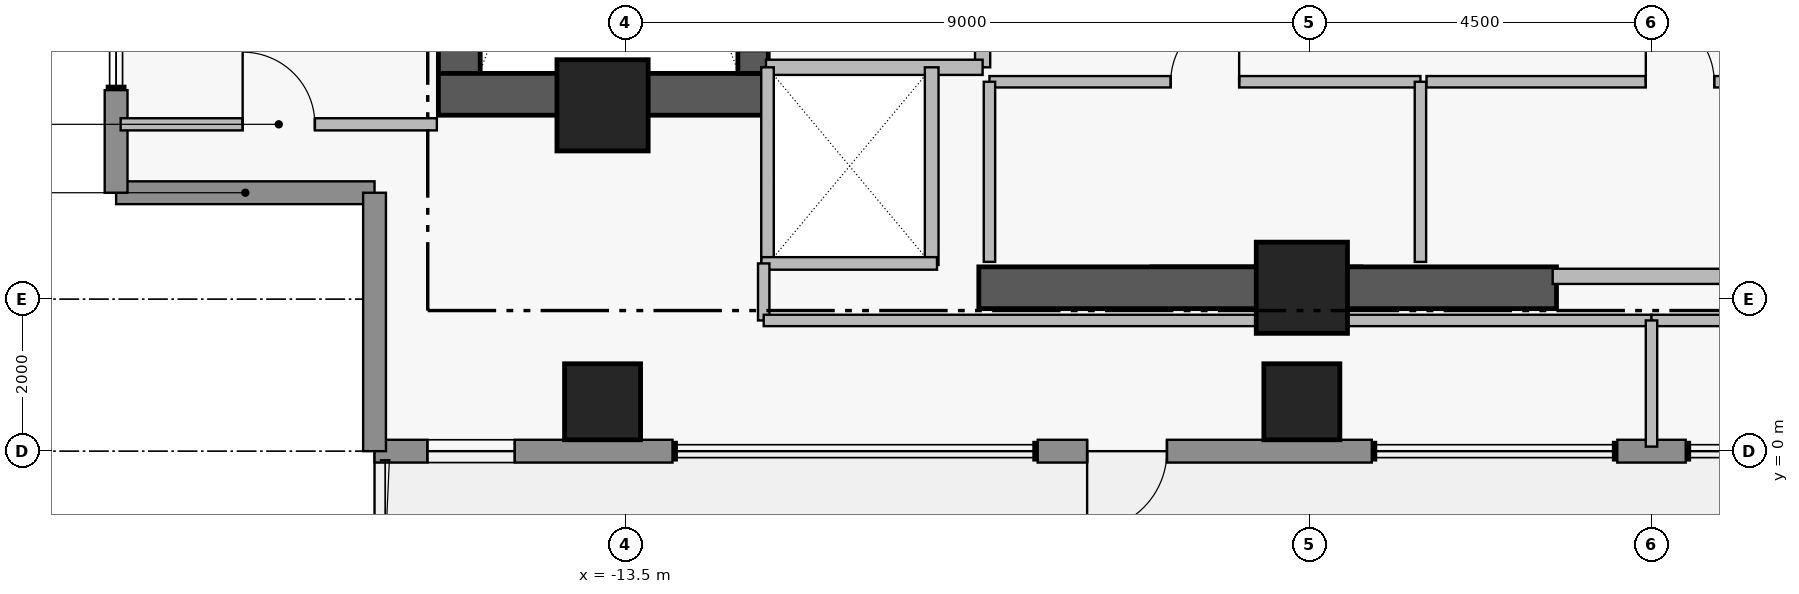
"""IFC4 building model, lengths in metres.
Left out: names, types, materials, properties, quantities, classifications, styles, units other than length and angle.
Written with IfcOpenShell. Run it as: python <this file> out.ifc"""

import sys

from ifc_helpers import new_model, si_unit, direction, frame, frame_2d, origin, origin_2d, place, context, subcontext, project, spatial, rectangle, extrude, element, fill, save


model = new_model("IFC4")
c1 = context("Model", 3, precision=1e-05, world=origin(), true_north=direction((0.0, 1.0)))
c2 = subcontext(c1, "Body", "Model", "MODEL_VIEW")
j1 = project(units=[si_unit("LENGTHUNIT", "METRE"), si_unit("PLANEANGLEUNIT", "RADIAN")], contexts=[c1])
p1 = place(None, origin())
s1 = spatial("IfcSite", under=j1, at=p1, CompositionType="ELEMENT")
p2 = place(p1, origin())
s2 = spatial("IfcBuilding", under=s1, at=p2, CompositionType="ELEMENT")
p3 = place(p2, frame((0.0, 0.0, 250.75)))
s3 = spatial("IfcBuildingStorey", under=s2, at=p3, CompositionType="ELEMENT", Elevation=250.75)
p4 = place(p3, frame((-15.685, 4.97, 0.0), z_axis=(0.0, 0.0, 1.0), x_axis=(0.0, 1.0, 0.0)))
e1 = element("IfcWall", 1, at=p4, inside=s3, PredefinedType="SHEAR", context=c2, shape_type="SweptSolid", body=[
    extrude(rectangle(XDim=8.96, YDim=0.55, at=frame_2d((4.48, 0.0))), origin(), (0.0, 0.0, 1.0), 3.51),
])
p5 = place(p3, frame((-15.96, 4.695, 0.0), z_axis=(0.0, 0.0, 1.0), x_axis=(1.0, 0.0, 0.0)))
e2 = element("IfcWall", 2, at=p5, inside=s3, PredefinedType="SHEAR", context=c2, shape_type="SweptSolid", body=[
    extrude(rectangle(XDim=4.36, YDim=0.55, at=frame_2d((2.18, 0.0))), origin(), (0.0, 0.0, 1.0), 3.51),
])
p6 = place(p3, frame((-8.85, 2.15, 0.0), z_axis=(0.0, 0.0, 1.0), x_axis=(1.0, 0.0, 0.0)))
e3 = element("IfcWall", 3, at=p6, inside=s3, PredefinedType="SHEAR", context=c2, shape_type="SweptSolid", body=[
    extrude(rectangle(XDim=7.6, YDim=0.55, at=frame_2d((3.8, 0.0))), origin(), (0.0, 0.0, 1.0), 3.48),
])
p7 = place(p3, frame((-11.82, 4.97, 0.0), z_axis=(0.0, 0.0, 1.0), x_axis=(0.0, 1.0, 0.0)))
e4 = element("IfcWall", 4, at=p7, inside=s3, PredefinedType="SHEAR", context=c2, shape_type="SweptSolid", body=[
    extrude(rectangle(XDim=8.96, YDim=0.4, at=frame_2d((4.48, 0.0))), origin(), (0.0, 0.0, 1.0), 3.51),
])
p8 = place(p7, frame((0.31, 0.0, 0.0)))
e5 = element("IfcOpeningElement", 5, at=p8, cuts=e4, PredefinedType="OPENING", context=c2, shape_type="SweptSolid", body=[
    extrude(rectangle(XDim=1.12, YDim=2.22, at=frame_2d((0.56, 1.11))), frame((0.0, 0.21, 0.0), z_axis=(0.0, -1.0, 0.0), x_axis=(1.0, 0.0, 0.0)), (0.0, 0.0, 1.0), 0.42),
])
for number, where, z_axis, x_axis in (
    (6, (-13.8, 4.55, 0.0), (0.0, 0.0, 1.0), (1.0, 0.0, 0.0)),
    (7, (-4.6, 2.15, 0.0), (0.0, 0.0, 1.0), (1.0, 0.0, 0.0)),
):
    element("IfcColumn", number, at=place(p3, frame(where, z_axis=z_axis, x_axis=x_axis)), inside=s3, PredefinedType="COLUMN", context=c2, shape_type="SweptSolid", body=[
        extrude(rectangle(XDim=1.2, YDim=1.2, at=origin_2d()), origin(), (0.0, 0.0, 1.0), 3.7),
    ])
for number, where, z_axis, x_axis in (
    (8, (-13.8, 0.65, 0.0), (0.0, 0.0, 1.0), (1.0, 0.0, 0.0)),
    (9, (-4.6, 0.65, 0.0), (0.0, 0.0, 1.0), (1.0, 0.0, 0.0)),
):
    element("IfcColumn", number, at=place(p3, frame(where, z_axis=z_axis, x_axis=x_axis)), inside=s3, PredefinedType="COLUMN", context=c2, shape_type="SweptSolid", body=[
        extrude(rectangle(XDim=1.0, YDim=1.0, at=origin_2d()), origin(), (0.0, 0.0, 1.0), 3.7),
    ])
p9 = place(p3, frame((-16.8, 3.4, 0.0), z_axis=(0.0, 0.0, 1.0), x_axis=(-1.0, 0.0, 0.0)))
e10 = element("IfcWall", 10, at=p9, inside=s3, PredefinedType="STANDARD", context=c2, shape_type="SweptSolid", body=[
    extrude(rectangle(XDim=3.4, YDim=0.3, at=frame_2d((1.7, 0.0))), origin(), (0.0, 0.0, 1.0), 3.48),
])
p10 = place(p3, frame((-20.2, 3.4, 0.0), z_axis=(0.0, 0.0, 1.0), x_axis=(0.0, 1.0, 0.0)))
e11 = element("IfcWall", 11, at=p10, inside=s3, PredefinedType="STANDARD", context=c2, shape_type="SweptSolid", body=[
    extrude(rectangle(XDim=1.35, YDim=0.3, at=frame_2d((0.675, 0.0))), origin(), (0.0, 0.0, 1.0), 3.48),
])
p11 = place(p3, frame((0.45, 0.0, 0.0), z_axis=(0.0, 0.0, 1.0), x_axis=(-1.0, 0.0, 0.0)))
e12 = element("IfcWall", 12, at=p11, inside=s3, PredefinedType="STANDARD", context=c2, shape_type="SweptSolid", body=[
    extrude(rectangle(XDim=0.9, YDim=0.3, at=frame_2d((0.45, 0.0))), origin(), (0.0, 0.0, 1.0), 3.48),
])
p12 = place(p3, frame((-3.68, 0.0, 0.0), z_axis=(0.0, 0.0, 1.0), x_axis=(-1.0, 0.0, 0.0)))
e13 = element("IfcWall", 13, at=p12, inside=s3, PredefinedType="STANDARD", context=c2, shape_type="SweptSolid", body=[
    extrude(rectangle(XDim=4.395, YDim=0.3, at=frame_2d((2.198, 0.0))), origin(), (0.0, 0.0, 1.0), 3.48),
])
p13 = place(p12, frame((2.695, 0.0, 0.0)))
e14 = element("IfcOpeningElement", 14, at=p13, cuts=e13, PredefinedType="OPENING", context=c2, shape_type="SweptSolid", body=[
    extrude(rectangle(XDim=1.05, YDim=2.2, at=frame_2d((0.525, 1.1))), frame((0.0, 0.16, 0.0), z_axis=(0.0, -1.0, 0.0), x_axis=(1.0, 0.0, 0.0)), (0.0, 0.0, 1.0), 0.32),
])
p14 = place(p3, frame((-12.88, 0.0, 0.0), z_axis=(0.0, 0.0, 1.0), x_axis=(-1.0, 0.0, 0.0)))
e15 = element("IfcWall", 15, at=p14, inside=s3, PredefinedType="STANDARD", context=c2, shape_type="SweptSolid", body=[
    extrude(rectangle(XDim=3.92, YDim=0.3, at=frame_2d((1.96, 0.0))), origin(), (0.0, 0.0, 1.0), 3.48),
])
p15 = place(p14, frame((2.075, 0.0, 0.95)))
e16 = element("IfcOpeningElement", 16, at=p15, cuts=e15, PredefinedType="OPENING", context=c2, shape_type="SweptSolid", body=[
    extrude(rectangle(XDim=1.15, YDim=1.55, at=frame_2d((0.575, 0.775))), frame((0.0, 0.16, 0.0), z_axis=(0.0, -1.0, 0.0), x_axis=(1.0, 0.0, 0.0)), (0.0, 0.0, 1.0), 0.32),
])
p16 = place(p3, frame((-16.8, 0.0, 0.0), z_axis=(0.0, 0.0, 1.0), x_axis=(0.0, 1.0, 0.0)))
e17 = element("IfcWall", 17, at=p16, inside=s3, PredefinedType="STANDARD", context=c2, shape_type="SweptSolid", body=[
    extrude(rectangle(XDim=3.4, YDim=0.3, at=frame_2d((1.7, 0.0))), origin(), (0.0, 0.0, 1.0), 3.48),
])
p17 = place(p3, frame((-8.8, 5.05, 0.0), z_axis=(0.0, 0.0, 1.0), x_axis=(0.0, 1.0, 0.0)))
e18 = element("IfcWall", 18, at=p17, inside=s3, PredefinedType="PARTITIONING", context=c2, shape_type="SweptSolid", body=[
    extrude(rectangle(XDim=6.1, YDim=0.2, at=frame_2d((3.05, 0.0))), origin(), (0.0, 0.0, 1.0), 3.48),
])
p18 = place(p17, frame((0.25, 0.0, 0.0)))
e19 = element("IfcOpeningElement", 19, at=p18, cuts=e18, PredefinedType="OPENING", context=c2, shape_type="SweptSolid", body=[
    extrude(rectangle(XDim=1.1, YDim=2.2, at=frame_2d((0.55, 1.1))), frame((0.0, 0.11, 0.0), z_axis=(0.0, -1.0, 0.0), x_axis=(1.0, 0.0, 0.0)), (0.0, 0.0, 1.0), 0.22),
])
p19 = place(p17, frame((3.85, 0.0, 0.0)))
e20 = element("IfcOpeningElement", 20, at=p19, cuts=e18, PredefinedType="OPENING", context=c2, shape_type="SweptSolid", body=[
    extrude(rectangle(XDim=1.1, YDim=2.2, at=frame_2d((0.55, 1.1))), frame((0.0, 0.11, 0.0), z_axis=(0.0, -1.0, 0.0), x_axis=(1.0, 0.0, 0.0)), (0.0, 0.0, 1.0), 0.22),
])
p20 = place(p3, frame((-8.71, 4.86, 0.0), z_axis=(0.0, 0.0, 1.0), x_axis=(1.0, 0.0, 0.0)))
e21 = element("IfcWall", 21, at=p20, inside=s3, PredefinedType="PARTITIONING", context=c2, shape_type="SweptSolid", body=[
    extrude(rectangle(XDim=5.67, YDim=0.15, at=frame_2d((2.835, 0.0))), origin(), (0.0, 0.0, 1.0), 3.48),
])
p21 = place(p20, frame((2.385, 0.0, 0.0)))
e22 = element("IfcOpeningElement", 22, at=p21, cuts=e21, PredefinedType="OPENING", context=c2, shape_type="SweptSolid", body=[
    extrude(rectangle(XDim=0.9, YDim=2.15, at=frame_2d((0.45, 1.075))), frame((0.0, 0.085, 0.0), z_axis=(0.0, -1.0, 0.0), x_axis=(1.0, 0.0, 0.0)), (0.0, 0.0, 1.0), 0.17),
])
p22 = place(p3, frame((-2.96, 4.86, 0.0), z_axis=(0.0, 0.0, 1.0), x_axis=(1.0, 0.0, 0.0)))
e23 = element("IfcWall", 23, at=p22, inside=s3, PredefinedType="PARTITIONING", context=c2, shape_type="SweptSolid", body=[
    extrude(rectangle(XDim=6.67, YDim=0.15, at=frame_2d((3.335, 0.0))), origin(), (0.0, 0.0, 1.0), 3.48),
])
p23 = place(p22, frame((2.885, 0.0, 0.0)))
e24 = element("IfcOpeningElement", 24, at=p23, cuts=e23, PredefinedType="OPENING", context=c2, shape_type="SweptSolid", body=[
    extrude(rectangle(XDim=0.9, YDim=2.15, at=frame_2d((0.45, 1.075))), frame((0.0, 0.085, 0.0), z_axis=(0.0, -1.0, 0.0), x_axis=(1.0, 0.0, 0.0)), (0.0, 0.0, 1.0), 0.17),
])
p24 = place(p3, frame((-20.14, 4.3, 0.0), z_axis=(0.0, 0.0, 1.0), x_axis=(1.0, 0.0, 0.0)))
e25 = element("IfcWall", 25, at=p24, inside=s3, PredefinedType="PARTITIONING", context=c2, shape_type="SweptSolid", body=[
    extrude(rectangle(XDim=4.16, YDim=0.16, at=frame_2d((2.08, 0.0))), origin(), (0.0, 0.0, 1.0), 3.48),
])
p25 = place(p24, frame((1.605, 0.0, 0.0)))
e26 = element("IfcOpeningElement", 26, at=p25, cuts=e25, PredefinedType="OPENING", context=c2, shape_type="SweptSolid", body=[
    extrude(rectangle(XDim=0.95, YDim=2.15, at=frame_2d((0.475, 1.075))), frame((0.0, 0.09, 0.0), z_axis=(0.0, -1.0, 0.0), x_axis=(1.0, 0.0, 0.0)), (0.0, 0.0, 1.0), 0.18),
])
p26 = place(p3, frame((-11.65, 5.05, 0.0), z_axis=(0.0, 0.0, 1.0), x_axis=(1.0, 0.0, 0.0)))
e27 = element("IfcWall", 27, at=p26, inside=s3, PredefinedType="PARTITIONING", context=c2, shape_type="SweptSolid", body=[
    extrude(rectangle(XDim=2.85, YDim=0.2, at=frame_2d((1.425, 0.0))), origin(), (0.0, 0.0, 1.0), 3.48),
])
p27 = place(p3, frame((-1.3, 2.3, 0.0), z_axis=(0.0, 0.0, 1.0), x_axis=(1.0, 0.0, 0.0)))
e28 = element("IfcWall", 28, at=p27, inside=s3, PredefinedType="PARTITIONING", context=c2, shape_type="SweptSolid", body=[
    extrude(rectangle(XDim=2.6, YDim=0.2, at=frame_2d((1.3, 0.0))), origin(), (0.0, 0.0, 1.0), 2.38),
])
for number, where, z_axis, x_axis in (
    (29, (-8.71, 2.49, 0.0), (0.0, 0.0, 1.0), (0.0, 1.0, 0.0)),
    (30, (-3.04, 2.49, 0.0), (0.0, 0.0, 1.0), (0.0, 1.0, 0.0)),
):
    element("IfcWall", number, at=place(p3, frame(where, z_axis=z_axis, x_axis=x_axis)), inside=s3, PredefinedType="PARTITIONING", context=c2, shape_type="SweptSolid", body=[
        extrude(rectangle(XDim=2.37, YDim=0.15, at=frame_2d((1.185, 0.0))), origin(), (0.0, 0.0, 1.0), 3.48),
    ])
p28 = place(p3, frame((-9.47, 2.45, 0.0), z_axis=(0.0, 0.0, 1.0), x_axis=(0.0, 1.0, 0.0)))
e31 = element("IfcWall", 31, at=p28, inside=s3, PredefinedType="PARTITIONING", context=c2, shape_type="SweptSolid", body=[
    extrude(rectangle(XDim=2.6, YDim=0.18, at=frame_2d((1.3, 0.0))), origin(), (0.0, 0.0, 1.0), 3.48),
])
p29 = place(p3, frame((-11.63, 2.47, 0.0), z_axis=(0.0, 0.0, 1.0), x_axis=(0.0, 1.0, 0.0)))
e32 = element("IfcWall", 32, at=p29, inside=s3, PredefinedType="PARTITIONING", context=c2, shape_type="SweptSolid", body=[
    extrude(rectangle(XDim=2.58, YDim=0.165, at=frame_2d((1.29, 0.0))), origin(), (0.0, 0.0, 1.0), 3.48),
])
p30 = place(p3, frame((-11.71, 2.47, 0.0), z_axis=(0.0, 0.0, 1.0), x_axis=(1.0, 0.0, 0.0)))
e33 = element("IfcWall", 33, at=p30, inside=s3, PredefinedType="PARTITIONING", context=c2, shape_type="SweptSolid", body=[
    extrude(rectangle(XDim=2.31, YDim=0.165, at=frame_2d((1.155, 0.0))), origin(), (0.0, 0.0, 1.0), 2.38),
])
p31 = place(p3, frame((-11.68, 1.72, 0.0), z_axis=(0.0, 0.0, 1.0), x_axis=(0.0, 1.0, 0.0)))
e34 = element("IfcWall", 34, at=p31, inside=s3, PredefinedType="PARTITIONING", context=c2, shape_type="SweptSolid", body=[
    extrude(rectangle(XDim=0.75, YDim=0.15, at=frame_2d((0.375, 0.0))), origin(), (0.0, 0.0, 1.0), 3.48),
])
for number, where, z_axis, x_axis in (
    (35, (-11.68, 1.72, 0.0), (0.0, 0.0, 1.0), (1.0, 0.0, 0.0)),
    (36, (0.0, 1.72, 0.0), (0.0, 0.0, 1.0), (1.0, 0.0, 0.0)),
):
    element("IfcWall", number, at=place(p3, frame(where, z_axis=z_axis, x_axis=x_axis)), inside=s3, PredefinedType="PARTITIONING", context=c2, shape_type="SweptSolid", body=[
        extrude(rectangle(XDim=11.68, YDim=0.15, at=frame_2d((5.84, 0.0))), origin(), (0.0, 0.0, 1.0), 2.38),
    ])
p32 = place(p3, frame((0.0, 0.06, 0.0), z_axis=(0.0, 0.0, 1.0), x_axis=(0.0, 1.0, 0.0)))
e37 = element("IfcWall", 37, at=p32, inside=s3, PredefinedType="PARTITIONING", context=c2, shape_type="SweptSolid", body=[
    extrude(rectangle(XDim=1.66, YDim=0.15, at=frame_2d((0.83, 0.0))), origin(), (0.0, 0.0, 1.0), 3.48),
])
p33 = place(p13, origin())
e38 = element("IfcDoor", 38, at=p33, inside=s3, OperationType="SINGLE_SWING_RIGHT", PredefinedType="DOOR", context=c2, shape_type="SweptSolid", body=[
    extrude(rectangle(XDim=1.05, YDim=2.2, at=frame_2d((0.525, 1.1))), frame((0.0, 0.025, 0.0), z_axis=(0.0, -1.0, 0.0), x_axis=(1.0, 0.0, 0.0)), (0.0, 0.0, 1.0), 0.05),
])
fill(e14, e38)
p34 = place(p15, origin())
e39 = element("IfcWindow", 39, at=p34, inside=s3, PartitioningType="SINGLE_PANEL", PredefinedType="WINDOW", context=c2, shape_type="SweptSolid", body=[
    extrude(rectangle(XDim=1.15, YDim=1.55, at=frame_2d((0.575, 0.775))), frame((0.0, 0.03, 0.0), z_axis=(0.0, -1.0, 0.0), x_axis=(1.0, 0.0, 0.0)), (0.0, 0.0, 1.0), 0.06),
])
fill(e16, e39)
p35 = place(p21, origin())
e40 = element("IfcDoor", 40, at=p35, inside=s3, OperationType="SINGLE_SWING_RIGHT", PredefinedType="DOOR", context=c2, shape_type="SweptSolid", body=[
    extrude(rectangle(XDim=0.9, YDim=2.15, at=frame_2d((0.45, 1.075))), frame((0.0, 0.025, 0.0), z_axis=(0.0, -1.0, 0.0), x_axis=(1.0, 0.0, 0.0)), (0.0, 0.0, 1.0), 0.05),
])
fill(e22, e40)
p36 = place(p23, origin())
e41 = element("IfcDoor", 41, at=p36, inside=s3, OperationType="SINGLE_SWING_LEFT", PredefinedType="DOOR", context=c2, shape_type="SweptSolid", body=[
    extrude(rectangle(XDim=0.9, YDim=2.15, at=frame_2d((0.45, 1.075))), frame((0.0, 0.025, 0.0), z_axis=(0.0, -1.0, 0.0), x_axis=(1.0, 0.0, 0.0)), (0.0, 0.0, 1.0), 0.05),
])
fill(e24, e41)
p37 = place(p25, origin())
e42 = element("IfcDoor", 42, at=p37, inside=s3, OperationType="SINGLE_SWING_LEFT", PredefinedType="DOOR", context=c2, shape_type="SweptSolid", body=[
    extrude(rectangle(XDim=0.95, YDim=2.15, at=frame_2d((0.475, 1.075))), frame((0.0, 0.025, 0.0), z_axis=(0.0, -1.0, 0.0), x_axis=(1.0, 0.0, 0.0)), (0.0, 0.0, 1.0), 0.05),
])
fill(e26, e42)
save(model, sys.argv[1])
